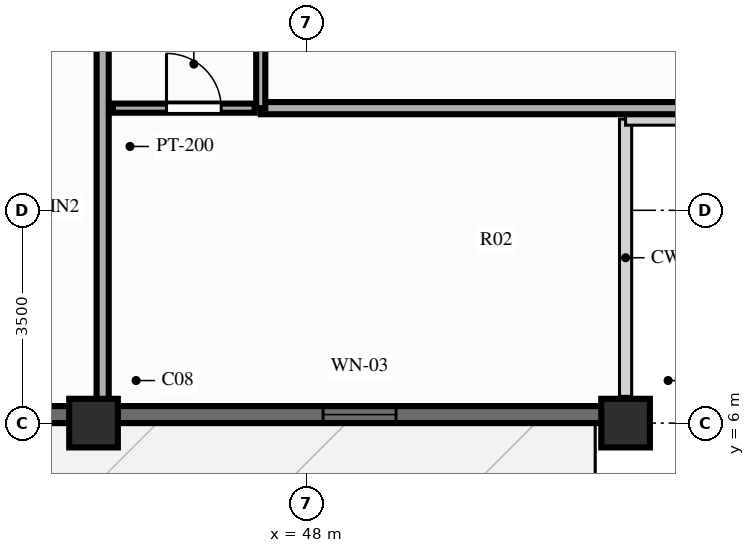
"""IFC4 building model, lengths in metres.
Left out: names, types, materials, properties, quantities, classifications, styles, units other than length and angle.
Written with IfcOpenShell. Run it as: python <this file> out.ifc"""

import sys

from ifc_helpers import new_model, si_unit, direction, frame, frame_2d, origin, origin_2d, place, context, subcontext, project, spatial, rectangle, extrude, source, transform, mapped, element, fill, save


model = new_model("IFC4")
c1 = context("Model", 3, precision=1e-05, world=origin(), true_north=direction((0.0, 1.0)))
c2 = subcontext(c1, "Body", "Model", "MODEL_VIEW")
j1 = project(units=[si_unit("LENGTHUNIT", "METRE"), si_unit("PLANEANGLEUNIT", "RADIAN")], contexts=[c1])
p1 = place(None, origin())
s1 = spatial("IfcSite", under=j1, at=p1, CompositionType="ELEMENT")
p2 = place(p1, origin())
s2 = spatial("IfcBuilding", under=s1, at=p2, CompositionType="ELEMENT")
p3 = place(p2, frame((0.0, 0.0, 186.7)))
s3 = spatial("IfcBuildingStorey", under=s2, at=p3, CompositionType="ELEMENT", Elevation=186.7)
m1 = source(origin(), c2, "Body", "SweptSolid", [
    extrude(rectangle(XDim=0.8, YDim=0.8, at=origin_2d()), origin(), (0.0, 0.0, 1.0), 3.0),
])
for number, where, z_axis, x_axis in (
    (1, (44.5, 6.0, 0.0), (0.0, 0.0, 1.0), (1.0, 0.0, 0.0)),
    (2, (53.25, 6.0, 0.0), (0.0, 0.0, 1.0), (1.0, 0.0, 0.0)),
):
    element("IfcColumn", number, at=place(p3, frame(where, z_axis=z_axis, x_axis=x_axis)), inside=s3, PredefinedType="COLUMN", context=c2, shape_type="MappedRepresentation", body=[
        mapped(m1, transform((0.0, 0.0, 0.0), scale=1.0)),
    ])
p4 = place(p3, frame((22.75, 6.14, 0.0), z_axis=(0.0, 0.0, 1.0), x_axis=(1.0, 0.0, 0.0)))
e3 = element("IfcWall", 3, at=p4, inside=s3, PredefinedType="SOLIDWALL", context=c2, shape_type="SweptSolid", body=[
    extrude(rectangle(XDim=30.5, YDim=0.28, at=frame_2d((15.25, 0.0))), origin(), (0.0, 0.0, 1.0), 2.28),
])
p5 = place(p4, frame((4.925, 0.0, 0.0), z_axis=(0.0, 0.0, 1.0), x_axis=(-1.0, 0.0, 0.0)))
e4 = element("IfcOpeningElement", 4, at=p5, cuts=e3, PredefinedType="OPENING", context=c2, shape_type="SweptSolid", body=[
    extrude(rectangle(XDim=1.1, YDim=2.15, at=frame_2d((0.55, 1.075))), frame((0.0, 0.152, 0.0), z_axis=(0.0, -1.0, 0.0), x_axis=(1.0, 0.0, 0.0)), (0.0, 0.0, 1.0), 0.304),
])
p6 = place(p4, frame((11.387, 0.0, 0.25)))
e5 = element("IfcOpeningElement", 5, at=p6, cuts=e3, PredefinedType="OPENING", context=c2, shape_type="SweptSolid", body=[
    extrude(rectangle(XDim=1.2, YDim=1.5, at=frame_2d((0.6, 0.75))), frame((0.0, 0.152, 0.0), z_axis=(0.0, -1.0, 0.0), x_axis=(1.0, 0.0, 0.0)), (0.0, 0.0, 1.0), 0.304),
])
p7 = place(p4, frame((15.484, 0.0, 0.25)))
e6 = element("IfcOpeningElement", 6, at=p7, cuts=e3, PredefinedType="OPENING", context=c2, shape_type="SweptSolid", body=[
    extrude(rectangle(XDim=1.2, YDim=1.5, at=frame_2d((0.6, 0.75))), frame((0.0, 0.152, 0.0), z_axis=(0.0, -1.0, 0.0), x_axis=(1.0, 0.0, 0.0)), (0.0, 0.0, 1.0), 0.304),
])
p8 = place(p4, frame((17.628, 0.0, 0.25)))
e7 = element("IfcOpeningElement", 7, at=p8, cuts=e3, PredefinedType="OPENING", context=c2, shape_type="SweptSolid", body=[
    extrude(rectangle(XDim=1.2, YDim=1.5, at=frame_2d((0.6, 0.75))), frame((0.0, 0.152, 0.0), z_axis=(0.0, -1.0, 0.0), x_axis=(1.0, 0.0, 0.0)), (0.0, 0.0, 1.0), 0.304),
])
p9 = place(p4, frame((19.791, 0.0, 0.25)))
e8 = element("IfcOpeningElement", 8, at=p9, cuts=e3, PredefinedType="OPENING", context=c2, shape_type="SweptSolid", body=[
    extrude(rectangle(XDim=1.2, YDim=1.5, at=frame_2d((0.6, 0.75))), frame((0.0, 0.152, 0.0), z_axis=(0.0, -1.0, 0.0), x_axis=(1.0, 0.0, 0.0)), (0.0, 0.0, 1.0), 0.304),
])
p10 = place(p4, frame((25.525, 0.0, 0.25)))
e9 = element("IfcOpeningElement", 9, at=p10, cuts=e3, PredefinedType="OPENING", context=c2, shape_type="SweptSolid", body=[
    extrude(rectangle(XDim=1.2, YDim=1.5, at=frame_2d((0.6, 0.75))), frame((0.0, 0.152, 0.0), z_axis=(0.0, -1.0, 0.0), x_axis=(1.0, 0.0, 0.0)), (0.0, 0.0, 1.0), 0.304),
])
p11 = place(p3, frame((44.82, 11.18, 0.0), z_axis=(0.0, 0.0, 1.0), x_axis=(1.0, 0.0, 0.0)))
e10 = element("IfcWall", 10, at=p11, inside=s3, PredefinedType="PARTITIONING", context=c2, shape_type="SweptSolid", body=[
    extrude(rectangle(XDim=2.33, YDim=0.15, at=frame_2d((1.165, 0.0))), origin(), (0.0, 0.0, 1.0), 2.79),
])
p12 = place(p11, frame((0.88, 0.0, 0.0)))
e11 = element("IfcOpeningElement", 11, at=p12, cuts=e10, PredefinedType="OPENING", context=c2, shape_type="SweptSolid", body=[
    extrude(rectangle(XDim=0.9, YDim=2.1, at=frame_2d((0.45, 1.05))), frame((0.0, 0.087, 0.0), z_axis=(0.0, -1.0, 0.0), x_axis=(1.0, 0.0, 0.0)), (0.0, 0.0, 1.0), 0.174),
])
p13 = place(p3, frame((44.65, 14.95, 0.0), z_axis=(0.0, 0.0, 1.0), x_axis=(0.0, -1.0, 0.0)))
e12 = element("IfcWall", 12, at=p13, inside=s3, PredefinedType="PARTITIONING", context=c2, shape_type="SweptSolid", body=[
    extrude(rectangle(XDim=8.8, YDim=0.2, at=frame_2d((4.4, 0.0))), origin(), (0.0, 0.0, 1.0), 2.39),
])
p14 = place(p3, frame((47.25, 11.18, 0.0), z_axis=(0.0, 0.0, 1.0), x_axis=(1.0, 0.0, 0.0)))
e13 = element("IfcWall", 13, at=p14, inside=s3, PredefinedType="PARTITIONING", context=c2, shape_type="SweptSolid", body=[
    extrude(rectangle(XDim=10.85, YDim=0.2, at=frame_2d((5.425, 0.0))), origin(), (0.0, 0.0, 1.0), 2.79),
])
p15 = place(p3, frame((47.25, 11.18, 0.0), z_axis=(0.0, 0.0, 1.0), x_axis=(0.0, 1.0, 0.0)))
e14 = element("IfcWall", 14, at=p15, inside=s3, PredefinedType="PARTITIONING", context=c2, shape_type="SweptSolid", body=[
    extrude(rectangle(XDim=7.91, YDim=0.15, at=frame_2d((3.955, 0.0))), origin(), (0.0, 0.0, 1.0), 2.79),
])
p16 = place(p15, frame((3.405, 0.0, 0.0)))
e15 = element("IfcOpeningElement", 15, at=p16, cuts=e14, PredefinedType="OPENING", context=c2, shape_type="SweptSolid", body=[
    extrude(rectangle(XDim=1.1, YDim=2.15, at=frame_2d((0.55, 1.075))), frame((0.0, 0.087, 0.0), z_axis=(0.0, -1.0, 0.0), x_axis=(1.0, 0.0, 0.0)), (0.0, 0.0, 1.0), 0.174),
])
m2 = source(origin(), c2, "Body", "SweptSolid", [
    extrude(rectangle(XDim=1.2, YDim=1.5, at=frame_2d((0.6, 0.75))), frame((0.0, 0.03, 0.0), z_axis=(0.0, -1.0, 0.0), x_axis=(1.0, 0.0, 0.0)), (0.0, 0.0, 1.0), 0.06),
])
p17 = place(p10, origin())
e16 = element("IfcWindow", 16, at=p17, inside=s3, PartitioningType="SINGLE_PANEL", PredefinedType="WINDOW", context=c2, shape_type="MappedRepresentation", body=[
    mapped(m2, transform((0.0, 0.0, 0.0), scale=1.0)),
])
fill(e9, e16)
m3 = source(origin(), c2, "Body", "SweptSolid", [
    extrude(rectangle(XDim=0.9, YDim=2.1, at=frame_2d((0.45, 1.05))), frame((0.0, 0.025, 0.0), z_axis=(0.0, -1.0, 0.0), x_axis=(1.0, 0.0, 0.0)), (0.0, 0.0, 1.0), 0.05),
])
p18 = place(p12, origin())
e17 = element("IfcDoor", 17, at=p18, inside=s3, OperationType="SINGLE_SWING_LEFT", PredefinedType="DOOR", context=c2, shape_type="MappedRepresentation", body=[
    mapped(m3, transform((0.0, 0.0, 0.0), scale=1.0)),
])
fill(e11, e17)
save(model, sys.argv[1])
